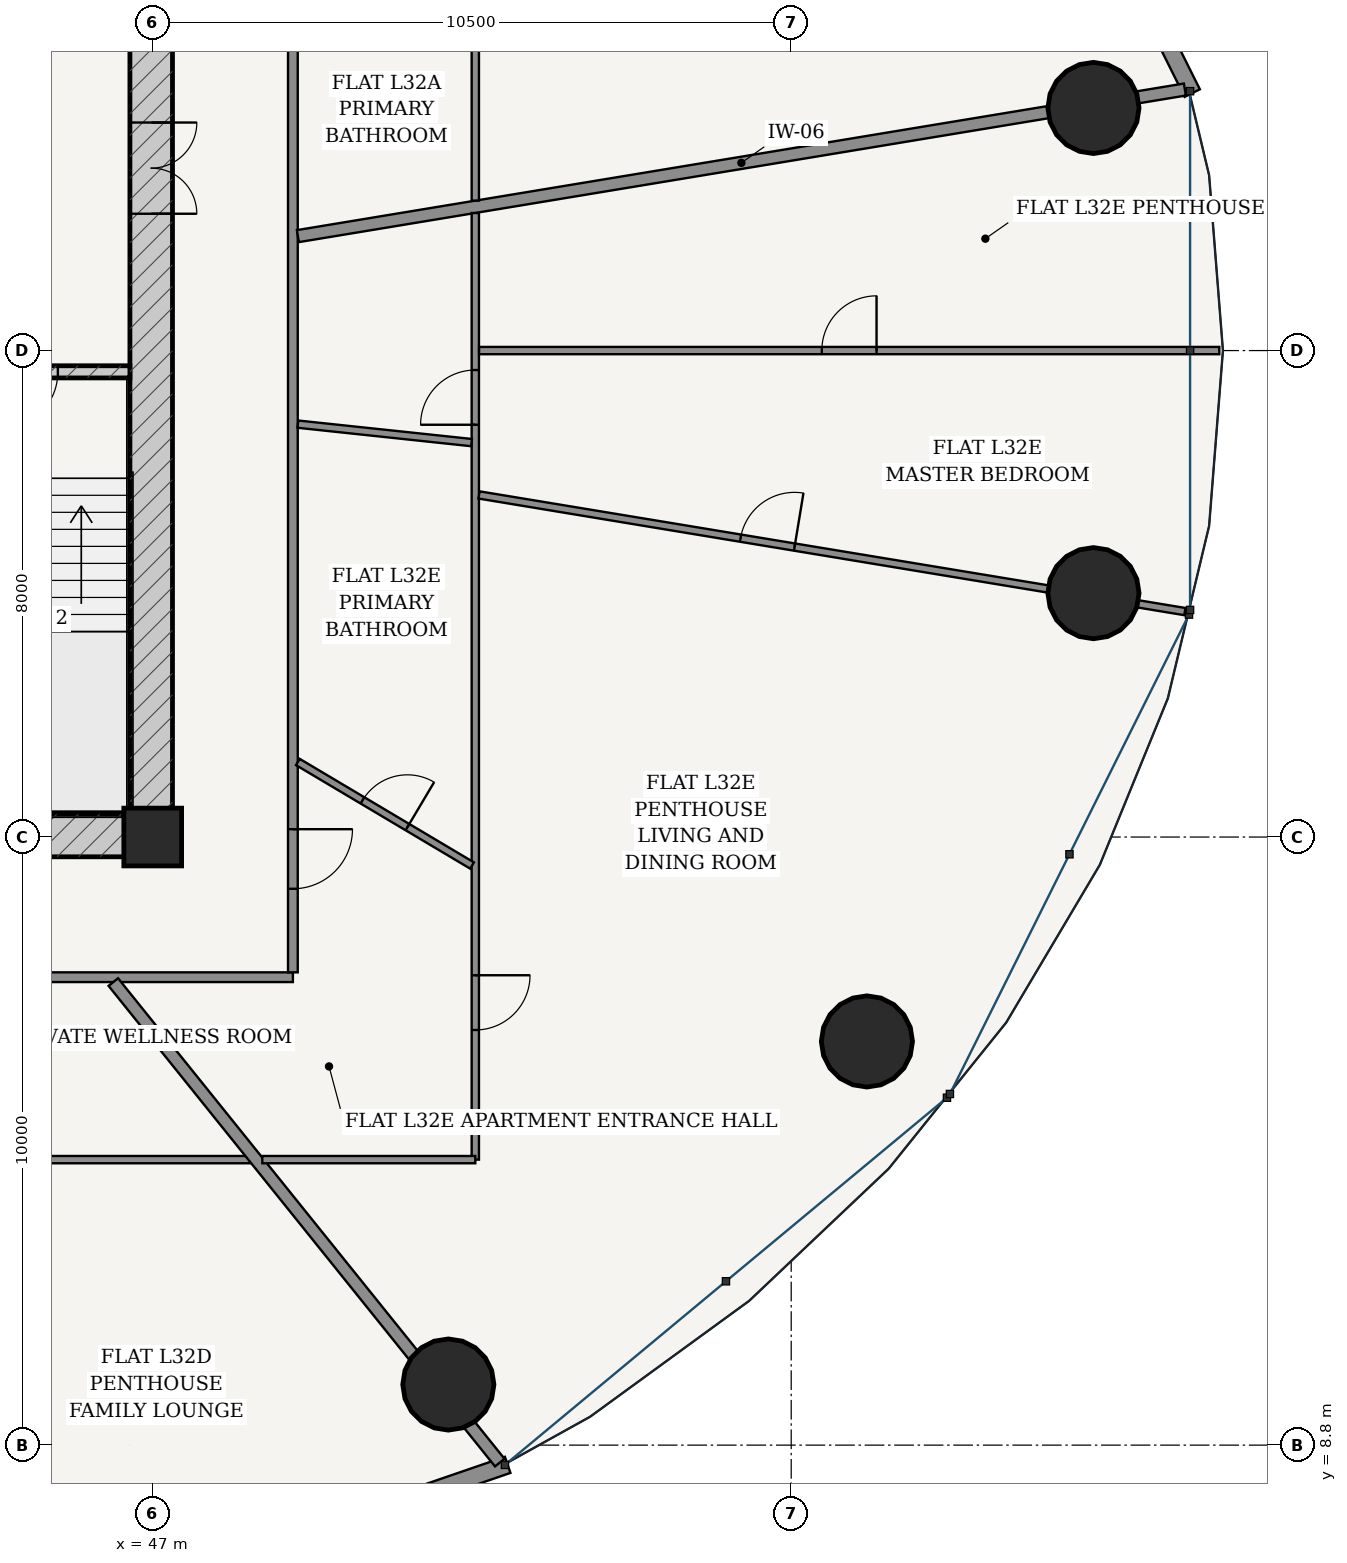
"""IFC4 building model, lengths in metres.
Left out: names, types, materials, properties, quantities, classifications, styles, units other than length and angle.
Written with IfcOpenShell. Run it as: python <this file> out.ifc"""

import sys

from ifc_helpers import new_model, si_unit, direction, frame, frame_2d, origin, origin_2d, place, context, subcontext, project, spatial, rectangle, hollow_circle, extrude, source, transform, mapped, element, fill, save


model = new_model("IFC4")
c1 = context("Model", 3, precision=1e-05, world=origin(), true_north=direction((-0.2419218956, 0.970295726276)))
c2 = subcontext(c1, "Body", "Model", "MODEL_VIEW")
j1 = project(units=[si_unit("LENGTHUNIT", "METRE"), si_unit("PLANEANGLEUNIT", "RADIAN")], contexts=[c1])
p1 = place(None, origin())
s1 = spatial("IfcSite", under=j1, at=p1, CompositionType="ELEMENT")
p2 = place(p1, origin())
s2 = spatial("IfcBuilding", under=s1, at=p2, CompositionType="ELEMENT")
p3 = place(p2, frame((0.0, 0.0, 123.0)))
s3 = spatial("IfcBuildingStorey", under=s2, at=p3, CompositionType="ELEMENT", Elevation=123.0)
p4 = place(p3, frame((47.0, 18.8, 0.0), z_axis=(0.0, 0.0, 1.0), x_axis=(1.0, 0.0, 0.0)))
e1 = element("IfcColumn", 1, at=p4, inside=s3, PredefinedType="COLUMN", context=c2, shape_type="SweptSolid", body=[
    extrude(rectangle(XDim=0.95, YDim=0.95, at=origin_2d()), origin(), (0.0, 0.0, 1.0), 3.6),
])
p5 = place(p3, frame((28.675, 18.825, 0.0), z_axis=(0.0, 0.0, 1.0), x_axis=(1.0, 0.0, 0.0)))
e2 = element("IfcWall", 2, at=p5, inside=s3, PredefinedType="SHEAR", context=c2, shape_type="SweptSolid", body=[
    extrude(rectangle(XDim=18.65, YDim=0.7, at=frame_2d((9.325, 0.0))), origin(), (0.0, 0.0, 1.0), 3.325),
])
p6 = place(p5, frame((8.9, 0.0, 0.0)))
e3 = element("IfcOpeningElement", 3, at=p6, cuts=e2, PredefinedType="OPENING", context=c2, shape_type="SweptSolid", body=[
    extrude(rectangle(XDim=0.85, YDim=2.1, at=frame_2d((0.425, 1.05))), frame((0.0, 0.36, 0.0), z_axis=(0.0, -1.0, 0.0), x_axis=(1.0, 0.0, 0.0)), (0.0, 0.0, 1.0), 0.72),
])
p7 = place(p3, frame((46.975, 19.175, 0.0), z_axis=(0.0, 0.0, 1.0), x_axis=(0.0, 1.0, 0.0)))
e4 = element("IfcWall", 4, at=p7, inside=s3, PredefinedType="SHEAR", context=c2, shape_type="SweptSolid", body=[
    extrude(rectangle(XDim=15.25, YDim=0.7, at=frame_2d((7.625, 0.0))), origin(), (0.0, 0.0, 1.0), 3.325),
])
p8 = place(p7, frame((9.875, 0.0, 0.0)))
e5 = element("IfcOpeningElement", 5, at=p8, cuts=e4, PredefinedType="OPENING", context=c2, shape_type="SweptSolid", body=[
    extrude(rectangle(XDim=1.5, YDim=2.2, at=frame_2d((0.75, 1.1))), frame((0.0, 0.36, 0.0), z_axis=(0.0, -1.0, 0.0), x_axis=(1.0, 0.0, 0.0)), (0.0, 0.0, 1.0), 0.72),
])
p9 = place(p3, frame((43.305, 26.45, 0.0), z_axis=(0.0, 0.0, 1.0), x_axis=(1.0, 0.0, 0.0)))
e6 = element("IfcWall", 6, at=p9, inside=s3, PredefinedType="SOLIDWALL", context=c2, shape_type="SweptSolid", body=[
    extrude(rectangle(XDim=3.32, YDim=0.2, at=frame_2d((1.66, 0.0))), origin(), (0.0, 0.0, 1.0), 3.325),
])
p10 = place(p9, frame((1.185, 0.0, 0.0)))
e7 = element("IfcOpeningElement", 7, at=p10, cuts=e6, PredefinedType="OPENING", context=c2, shape_type="SweptSolid", body=[
    extrude(rectangle(XDim=0.95, YDim=2.15, at=frame_2d((0.475, 1.075))), frame((0.0, 0.11, 0.0), z_axis=(0.0, -1.0, 0.0), x_axis=(1.0, 0.0, 0.0)), (0.0, 0.0, 1.0), 0.22),
])
for number, where, z_axis, x_axis in (
    (8, (62.471, 30.79, 0.0), (0.0, 0.0, 1.0), (1.0, 0.0, 0.0)),
    (9, (51.862, 9.796, 0.0), (0.0, 0.0, 1.0), (1.0, 0.0, 0.0)),
    (10, (58.745, 15.438, 0.0), (0.0, 0.0, 1.0), (1.0, 0.0, 0.0)),
    (11, (62.471, 22.81, 0.0), (0.0, 0.0, 1.0), (1.0, 0.0, 0.0)),
):
    element("IfcColumn", number, at=place(p3, frame(where, z_axis=z_axis, x_axis=x_axis)), inside=s3, PredefinedType="COLUMN", context=c2, shape_type="SweptSolid", body=[
        extrude(hollow_circle(Radius=0.75, WallThickness=0.045, at=origin_2d()), origin(), (0.0, 0.0, 1.0), 3.6),
    ])
p11 = place(p3, frame((64.095, 31.034, 0.0), z_axis=(0.0, 0.0, 1.0), x_axis=(-0.446263788661, 0.894901464369, 0.0)))
e12 = element("IfcWall", 12, at=p11, inside=s3, PredefinedType="SOLIDWALL", context=c2, shape_type="SweptSolid", body=[
    extrude(rectangle(XDim=9.05, YDim=0.28, at=frame_2d((4.525, 0.0))), origin(), (0.0, 0.0, 1.0), 3.325),
])
p12 = place(p11, frame((1.394, 0.0, 0.85)))
e13 = element("IfcOpeningElement", 13, at=p12, cuts=e12, PredefinedType="OPENING", context=c2, shape_type="SweptSolid", body=[
    extrude(rectangle(XDim=2.1, YDim=1.95, at=frame_2d((1.05, 0.975))), frame((0.0, 0.15, 0.0), z_axis=(0.0, -1.0, 0.0), x_axis=(1.0, 0.0, 0.0)), (0.0, 0.0, 1.0), 0.3),
])
p13 = place(p11, frame((5.557, 0.0, 0.85)))
e14 = element("IfcOpeningElement", 14, at=p13, cuts=e12, PredefinedType="OPENING", context=c2, shape_type="SweptSolid", body=[
    extrude(rectangle(XDim=2.1, YDim=1.95, at=frame_2d((1.05, 0.975))), frame((0.0, 0.15, 0.0), z_axis=(0.0, -1.0, 0.0), x_axis=(1.0, 0.0, 0.0)), (0.0, 0.0, 1.0), 0.3),
])
p14 = place(p3, frame((43.108, 5.128, 0.0), z_axis=(0.0, 0.0, 1.0), x_axis=(0.945590132341, 0.325360264351, 0.0)))
e15 = element("IfcWall", 15, at=p14, inside=s3, PredefinedType="SOLIDWALL", context=c2, shape_type="SweptSolid", body=[
    extrude(rectangle(XDim=10.289, YDim=0.28, at=frame_2d((5.145, 0.0))), origin(), (0.0, 0.0, 1.0), 3.325),
])
p15 = place(p14, frame((1.728, 0.0, 0.85)))
e16 = element("IfcOpeningElement", 16, at=p15, cuts=e15, PredefinedType="OPENING", context=c2, shape_type="SweptSolid", body=[
    extrude(rectangle(XDim=2.1, YDim=1.95, at=frame_2d((1.05, 0.975))), frame((0.0, 0.15, 0.0), z_axis=(0.0, -1.0, 0.0), x_axis=(1.0, 0.0, 0.0)), (0.0, 0.0, 1.0), 0.3),
])
p16 = place(p14, frame((6.461, 0.0, 0.85)))
e17 = element("IfcOpeningElement", 17, at=p16, cuts=e15, PredefinedType="OPENING", context=c2, shape_type="SweptSolid", body=[
    extrude(rectangle(XDim=2.1, YDim=1.95, at=frame_2d((1.05, 0.975))), frame((0.0, 0.15, 0.0), z_axis=(0.0, -1.0, 0.0), x_axis=(1.0, 0.0, 0.0)), (0.0, 0.0, 1.0), 0.3),
])
p17 = place(p3, frame((26.695, 16.495, 0.0), z_axis=(0.0, 0.0, 1.0), x_axis=(1.0, 0.0, 0.0)))
e18 = element("IfcWall", 18, at=p17, inside=s3, PredefinedType="PARTITIONING", context=c2, shape_type="SweptSolid", body=[
    extrude(rectangle(XDim=22.61, YDim=0.16, at=frame_2d((11.305, 0.0))), origin(), (0.0, 0.0, 1.0), 2.767),
])
p18 = place(p17, frame((4.883, 0.0, 0.0)))
e19 = element("IfcOpeningElement", 19, at=p18, cuts=e18, PredefinedType="OPENING", context=c2, shape_type="SweptSolid", body=[
    extrude(rectangle(XDim=0.98, YDim=2.2, at=frame_2d((0.49, 1.1))), frame((0.0, 0.09, 0.0), z_axis=(0.0, -1.0, 0.0), x_axis=(1.0, 0.0, 0.0)), (0.0, 0.0, 1.0), 0.18),
])
p19 = place(p3, frame((49.305, 16.575, 0.0), z_axis=(0.0, 0.0, 1.0), x_axis=(0.0, 1.0, 0.0)))
e20 = element("IfcWall", 20, at=p19, inside=s3, PredefinedType="PARTITIONING", context=c2, shape_type="SweptSolid", body=[
    extrude(rectangle(XDim=20.45, YDim=0.16, at=frame_2d((10.225, 0.0))), origin(), (0.0, 0.0, 1.0), 2.767),
])
p20 = place(p19, frame((17.66, 0.0, 0.0)))
e21 = element("IfcOpeningElement", 21, at=p20, cuts=e20, PredefinedType="OPENING", context=c2, shape_type="SweptSolid", body=[
    extrude(rectangle(XDim=0.98, YDim=2.2, at=frame_2d((0.49, 1.1))), frame((0.0, 0.09, 0.0), z_axis=(0.0, -1.0, 0.0), x_axis=(1.0, 0.0, 0.0)), (0.0, 0.0, 1.0), 0.18),
])
p21 = place(p19, frame((1.374, 0.0, 0.0)))
e22 = element("IfcOpeningElement", 22, at=p21, cuts=e20, PredefinedType="OPENING", context=c2, shape_type="SweptSolid", body=[
    extrude(rectangle(XDim=0.98, YDim=2.2, at=frame_2d((0.49, 1.1))), frame((0.0, 0.09, 0.0), z_axis=(0.0, -1.0, 0.0), x_axis=(1.0, 0.0, 0.0)), (0.0, 0.0, 1.0), 0.18),
])
p22 = place(p3, frame((49.387, 28.682, 0.0), z_axis=(0.0, 0.0, 1.0), x_axis=(0.986617934215, 0.163049231479, 0.0)))
e23 = element("IfcWall", 23, at=p22, inside=s3, PredefinedType="PARTITIONING", context=c2, shape_type="SweptSolid", body=[
    extrude(rectangle(XDim=14.785, YDim=0.2, at=frame_2d((7.392, 0.0))), origin(), (0.0, 0.0, 1.0), 2.767),
])
p23 = place(p3, frame((52.305, 40.105, 0.0), z_axis=(0.0, 0.0, 1.0), x_axis=(0.0, -1.0, 0.0)))
e24 = element("IfcWall", 24, at=p23, inside=s3, PredefinedType="PARTITIONING", context=c2, shape_type="SweptSolid", body=[
    extrude(rectangle(XDim=10.839, YDim=0.12, at=frame_2d((5.419, 0.0))), origin(), (0.0, 0.0, 1.0), 2.767),
])
p24 = place(p23, frame((2.675, 0.0, 0.0)))
e25 = element("IfcOpeningElement", 25, at=p24, cuts=e24, PredefinedType="OPENING", context=c2, shape_type="SweptSolid", body=[
    extrude(rectangle(XDim=0.9, YDim=2.15, at=frame_2d((0.45, 1.075))), frame((0.0, 0.07, 0.0), z_axis=(0.0, -1.0, 0.0), x_axis=(1.0, 0.0, 0.0)), (0.0, 0.0, 1.0), 0.14),
])
p25 = place(p3, frame((48.598, 13.495, 0.0), z_axis=(0.0, 0.0, 1.0), x_axis=(-1.0, 0.0, 0.0)))
e26 = element("IfcWall", 26, at=p25, inside=s3, PredefinedType="PARTITIONING", context=c2, shape_type="SweptSolid", body=[
    extrude(rectangle(XDim=24.903, YDim=0.12, at=frame_2d((12.452, 0.0))), origin(), (0.0, 0.0, 1.0), 2.767),
])
p26 = place(p25, frame((17.72, 0.0, 0.0)))
e27 = element("IfcOpeningElement", 27, at=p26, cuts=e26, PredefinedType="OPENING", context=c2, shape_type="SweptSolid", body=[
    extrude(rectangle(XDim=0.9, YDim=2.15, at=frame_2d((0.45, 1.075))), frame((0.0, 0.07, 0.0), z_axis=(0.0, -1.0, 0.0), x_axis=(1.0, 0.0, 0.0)), (0.0, 0.0, 1.0), 0.14),
])
p27 = place(p25, frame((11.637, 0.0, 0.0)))
e28 = element("IfcOpeningElement", 28, at=p27, cuts=e26, PredefinedType="OPENING", context=c2, shape_type="SweptSolid", body=[
    extrude(rectangle(XDim=0.9, YDim=2.15, at=frame_2d((0.45, 1.075))), frame((0.0, 0.07, 0.0), z_axis=(0.0, -1.0, 0.0), x_axis=(1.0, 0.0, 0.0)), (0.0, 0.0, 1.0), 0.14),
])
p28 = place(p25, frame((3.376, 0.0, 0.0)))
e29 = element("IfcOpeningElement", 29, at=p28, cuts=e26, PredefinedType="OPENING", context=c2, shape_type="SweptSolid", body=[
    extrude(rectangle(XDim=0.9, YDim=2.15, at=frame_2d((0.45, 1.075))), frame((0.0, 0.07, 0.0), z_axis=(0.0, -1.0, 0.0), x_axis=(1.0, 0.0, 0.0)), (0.0, 0.0, 1.0), 0.14),
])
p29 = place(p3, frame((46.352, 16.415, 0.0), z_axis=(0.0, 0.0, 1.0), x_axis=(0.626701127389, -0.779259710834, 0.0)))
e30 = element("IfcWall", 30, at=p29, inside=s3, PredefinedType="PARTITIONING", context=c2, shape_type="SweptSolid", body=[
    extrude(rectangle(XDim=10.141, YDim=0.2, at=frame_2d((5.071, 0.0))), origin(), (0.0, 0.0, 1.0), 2.767),
])
p30 = place(p3, frame((52.305, 29.062, 0.0), z_axis=(0.0, 0.0, 1.0), x_axis=(0.0, -1.0, 0.0)))
e31 = element("IfcWall", 31, at=p30, inside=s3, PredefinedType="PARTITIONING", context=c2, shape_type="SweptSolid", body=[
    extrude(rectangle(XDim=15.567, YDim=0.12, at=frame_2d((7.783, 0.0))), origin(), (0.0, 0.0, 1.0), 2.767),
])
p31 = place(p30, frame((12.535, 0.0, 0.0)))
e32 = element("IfcOpeningElement", 32, at=p31, cuts=e31, PredefinedType="OPENING", context=c2, shape_type="SweptSolid", body=[
    extrude(rectangle(XDim=0.9, YDim=2.15, at=frame_2d((0.45, 1.075))), frame((0.0, 0.07, 0.0), z_axis=(0.0, -1.0, 0.0), x_axis=(1.0, 0.0, 0.0)), (0.0, 0.0, 1.0), 0.14),
])
p32 = place(p30, frame((2.582, 0.0, 0.0)))
e33 = element("IfcOpeningElement", 33, at=p32, cuts=e31, PredefinedType="OPENING", context=c2, shape_type="SweptSolid", body=[
    extrude(rectangle(XDim=0.9, YDim=2.15, at=frame_2d((0.45, 1.075))), frame((0.0, 0.07, 0.0), z_axis=(0.0, -1.0, 0.0), x_axis=(1.0, 0.0, 0.0)), (0.0, 0.0, 1.0), 0.14),
])
p33 = place(p3, frame((52.305, 13.495, 0.0), z_axis=(0.0, 0.0, 1.0), x_axis=(-1.0, 0.0, 0.0)))
e34 = element("IfcWall", 34, at=p33, inside=s3, PredefinedType="PARTITIONING", context=c2, shape_type="SweptSolid", body=[
    extrude(rectangle(XDim=3.503, YDim=0.12, at=frame_2d((1.751, 0.0))), origin(), (0.0, 0.0, 1.0), 2.767),
])
p34 = place(p3, frame((52.366, 24.426, 0.0), z_axis=(0.0, 0.0, 1.0), x_axis=(0.986619012175, -0.163042708564, 0.0)))
e35 = element("IfcWall", 35, at=p34, inside=s3, PredefinedType="PARTITIONING", context=c2, shape_type="SweptSolid", body=[
    extrude(rectangle(XDim=11.765, YDim=0.12, at=frame_2d((5.883, 0.0))), origin(), (0.0, 0.0, 1.0), 2.767),
])
p35 = place(p34, frame((4.359, 0.0, 0.0)))
e36 = element("IfcOpeningElement", 36, at=p35, cuts=e35, PredefinedType="OPENING", context=c2, shape_type="SweptSolid", body=[
    extrude(rectangle(XDim=0.9, YDim=2.15, at=frame_2d((0.45, 1.075))), frame((0.0, 0.07, 0.0), z_axis=(0.0, -1.0, 0.0), x_axis=(1.0, 0.0, 0.0)), (0.0, 0.0, 1.0), 0.14),
])
p36 = place(p3, frame((52.367, 26.8, 0.0), z_axis=(0.0, 0.0, 1.0), x_axis=(1.0, 0.0, 0.0)))
e37 = element("IfcWall", 37, at=p36, inside=s3, PredefinedType="PARTITIONING", context=c2, shape_type="SweptSolid", body=[
    extrude(rectangle(XDim=12.173, YDim=0.12, at=frame_2d((6.086, 0.0))), origin(), (0.0, 0.0, 1.0), 2.767),
])
p37 = place(p36, frame((5.636, 0.0, 0.0)))
e38 = element("IfcOpeningElement", 38, at=p37, cuts=e37, PredefinedType="OPENING", context=c2, shape_type="SweptSolid", body=[
    extrude(rectangle(XDim=0.9, YDim=2.15, at=frame_2d((0.45, 1.075))), frame((0.0, 0.07, 0.0), z_axis=(0.0, -1.0, 0.0), x_axis=(1.0, 0.0, 0.0)), (0.0, 0.0, 1.0), 0.14),
])
p38 = place(p3, frame((49.387, 20.034, 0.0), z_axis=(0.0, 0.0, 1.0), x_axis=(0.859682842925, -0.510828160521, 0.0)))
e39 = element("IfcWall", 39, at=p38, inside=s3, PredefinedType="PARTITIONING", context=c2, shape_type="SweptSolid", body=[
    extrude(rectangle(XDim=3.333, YDim=0.12, at=frame_2d((1.666, 0.0))), origin(), (0.0, 0.0, 1.0), 3.325),
])
p39 = place(p38, frame((1.236, 0.0, 0.0)))
e40 = element("IfcOpeningElement", 40, at=p39, cuts=e39, PredefinedType="OPENING", context=c2, shape_type="SweptSolid", body=[
    extrude(rectangle(XDim=0.86, YDim=2.15, at=frame_2d((0.43, 1.075))), frame((0.0, 0.07, 0.0), z_axis=(0.0, -1.0, 0.0), x_axis=(1.0, 0.0, 0.0)), (0.0, 0.0, 1.0), 0.14),
])
p40 = place(p3, frame((49.387, 25.59, 0.0), z_axis=(0.0, 0.0, 1.0), x_axis=(0.99440393079, -0.105644793673, 0.0)))
e41 = element("IfcWall", 41, at=p40, inside=s3, PredefinedType="PARTITIONING", context=c2, shape_type="SweptSolid", body=[
    extrude(rectangle(XDim=2.873, YDim=0.12, at=frame_2d((1.436, 0.0))), origin(), (0.0, 0.0, 1.0), 3.325),
])
m1 = source(origin(), c2, "Body", "SweptSolid", [
    extrude(rectangle(XDim=1.5, YDim=2.2, at=frame_2d((0.75, 1.1))), frame((0.0, 0.025, 0.0), z_axis=(0.0, -1.0, 0.0), x_axis=(1.0, 0.0, 0.0)), (0.0, 0.0, 1.0), 0.05),
])
p41 = place(p8, frame((1.5, 0.0, 0.0), z_axis=(0.0, 0.0, 1.0), x_axis=(-1.0, 0.0, 0.0)))
e42 = element("IfcDoor", 42, at=p41, inside=s3, OperationType="DOUBLE_DOOR_SINGLE_SWING", PredefinedType="DOOR", context=c2, shape_type="MappedRepresentation", body=[
    mapped(m1, transform((0.0, 0.0, 0.0), scale=1.0)),
])
fill(e5, e42)
m2 = source(origin(), c2, "Body", "SweptSolid", [
    extrude(rectangle(XDim=0.95, YDim=2.15, at=frame_2d((0.475, 1.075))), frame((0.0, 0.025, 0.0), z_axis=(0.0, -1.0, 0.0), x_axis=(1.0, 0.0, 0.0)), (0.0, 0.0, 1.0), 0.05),
])
p42 = place(p10, frame((0.95, 0.0, 0.0), z_axis=(0.0, 0.0, 1.0), x_axis=(-1.0, 0.0, 0.0)))
e43 = element("IfcDoor", 43, at=p42, inside=s3, OperationType="SINGLE_SWING_RIGHT", PredefinedType="DOOR", context=c2, shape_type="MappedRepresentation", body=[
    mapped(m2, transform((0.0, 0.0, 0.0), scale=1.0)),
])
fill(e7, e43)
m3 = source(origin(), c2, "Body", "SweptSolid", [
    extrude(rectangle(XDim=0.98, YDim=2.2, at=frame_2d((0.49, 1.1))), frame((0.0, 0.025, 0.0), z_axis=(0.0, -1.0, 0.0), x_axis=(1.0, 0.0, 0.0)), (0.0, 0.0, 1.0), 0.05),
])
p43 = place(p21, frame((0.98, 0.0, 0.0), z_axis=(0.0, 0.0, 1.0), x_axis=(-1.0, 0.0, 0.0)))
e44 = element("IfcDoor", 44, at=p43, inside=s3, OperationType="SINGLE_SWING_LEFT", PredefinedType="DOOR", context=c2, shape_type="MappedRepresentation", body=[
    mapped(m3, transform((0.0, 0.0, 0.0), scale=1.0)),
])
fill(e22, e44)
m4 = source(origin(), c2, "Body", "SweptSolid", [
    extrude(rectangle(XDim=0.86, YDim=2.15, at=frame_2d((0.43, 1.075))), frame((0.0, 0.025, 0.0), z_axis=(0.0, -1.0, 0.0), x_axis=(1.0, 0.0, 0.0)), (0.0, 0.0, 1.0), 0.05),
])
p44 = place(p39, origin())
e45 = element("IfcDoor", 45, at=p44, inside=s3, OperationType="SINGLE_SWING_RIGHT", PredefinedType="DOOR", context=c2, shape_type="MappedRepresentation", body=[
    mapped(m4, transform((0.0, 0.0, 0.0), scale=1.0)),
])
fill(e40, e45)
m5 = source(origin(), c2, "Body", "SweptSolid", [
    extrude(rectangle(XDim=0.9, YDim=2.15, at=frame_2d((0.45, 1.075))), frame((0.0, 0.025, 0.0), z_axis=(0.0, -1.0, 0.0), x_axis=(1.0, 0.0, 0.0)), (0.0, 0.0, 1.0), 0.05),
])
p45 = place(p31, origin())
e46 = element("IfcDoor", 46, at=p45, inside=s3, OperationType="SINGLE_SWING_LEFT", PredefinedType="DOOR", context=c2, shape_type="MappedRepresentation", body=[
    mapped(m5, transform((0.0, 0.0, 0.0), scale=1.0)),
])
fill(e32, e46)
p46 = place(p35, origin())
e47 = element("IfcDoor", 47, at=p46, inside=s3, OperationType="SINGLE_SWING_RIGHT", PredefinedType="DOOR", context=c2, shape_type="MappedRepresentation", body=[
    mapped(m5, transform((0.0, 0.0, 0.0), scale=1.0)),
])
fill(e36, e47)
p47 = place(p32, frame((0.9, 0.0, 0.0), z_axis=(0.0, 0.0, 1.0), x_axis=(-1.0, 0.0, 0.0)))
e48 = element("IfcDoor", 48, at=p47, inside=s3, OperationType="SINGLE_SWING_LEFT", PredefinedType="DOOR", context=c2, shape_type="MappedRepresentation", body=[
    mapped(m5, transform((0.0, 0.0, 0.0), scale=1.0)),
])
fill(e33, e48)
p48 = place(p37, origin())
e49 = element("IfcDoor", 49, at=p48, inside=s3, OperationType="SINGLE_SWING_RIGHT", PredefinedType="DOOR", context=c2, shape_type="MappedRepresentation", body=[
    mapped(m5, transform((0.0, 0.0, 0.0), scale=1.0)),
])
fill(e38, e49)
save(model, sys.argv[1])
